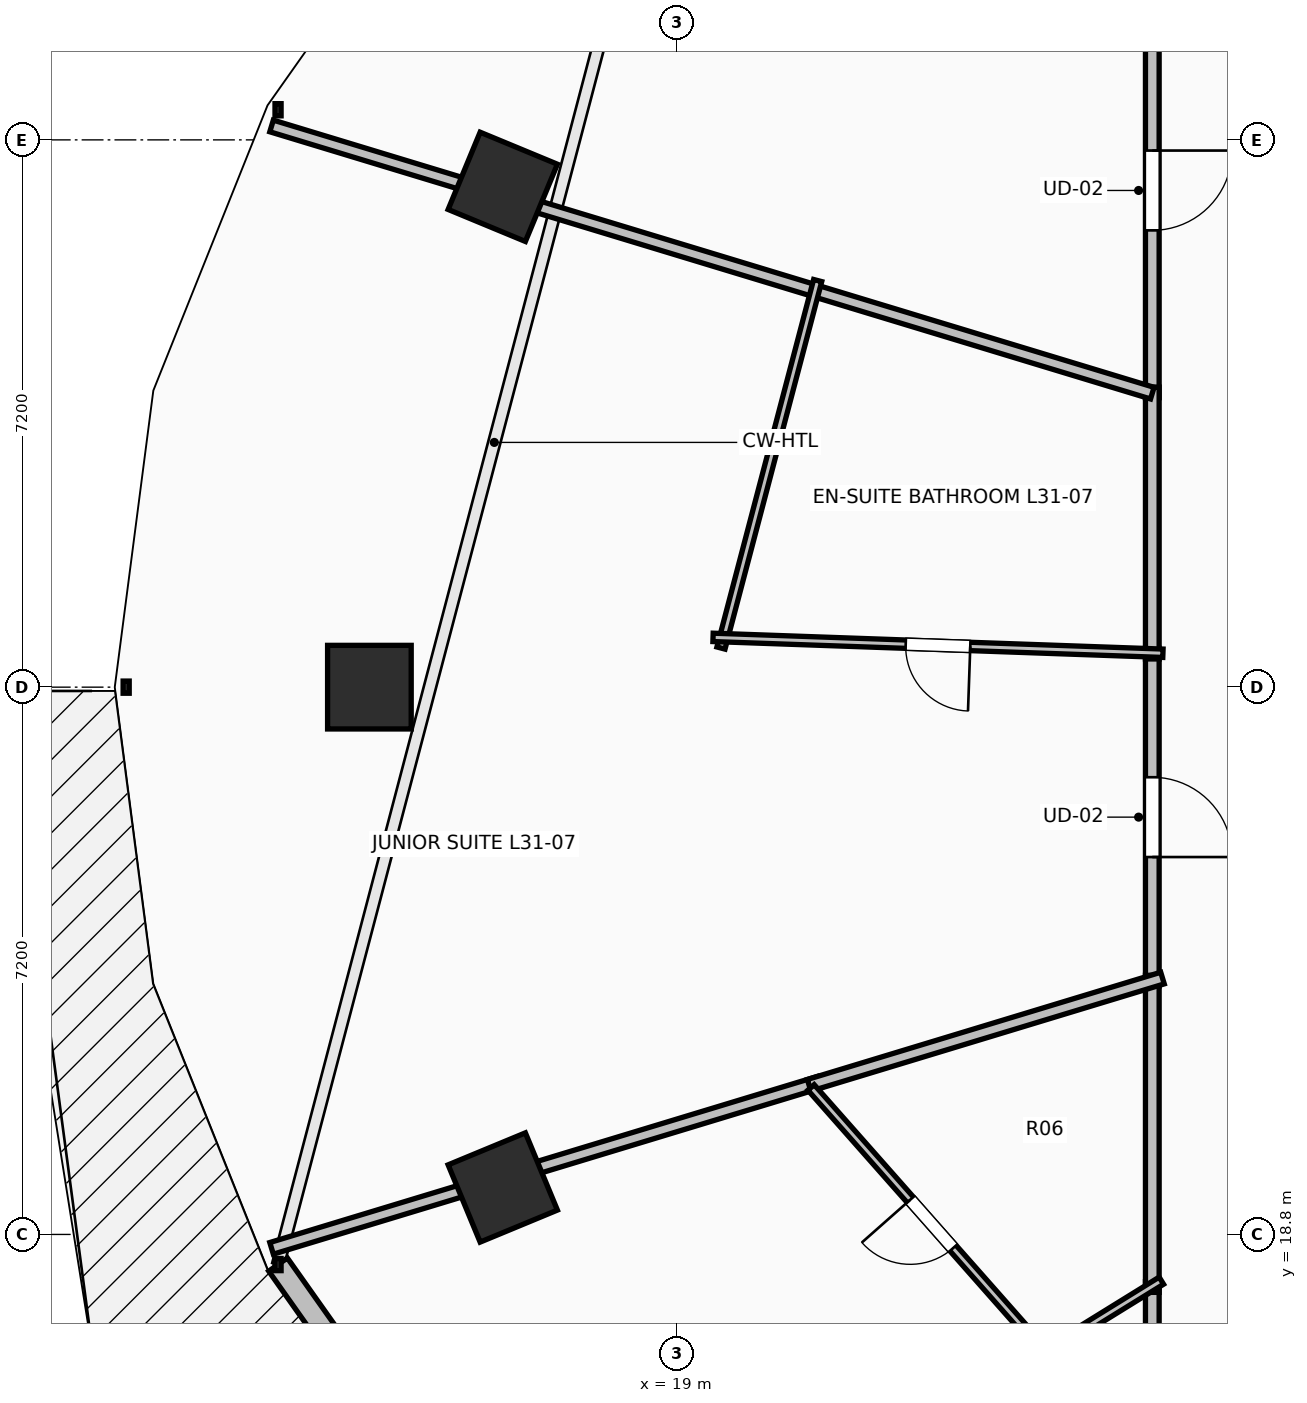
"""IFC4 building model, lengths in metres.
Left out: names, types, materials, properties, quantities, classifications, styles, units other than length and angle.
Written with IfcOpenShell. Run it as: python <this file> out.ifc"""

import sys

from ifc_helpers import new_model, si_unit, direction, frame, frame_2d, origin, origin_2d, place, context, subcontext, project, spatial, rectangle, extrude, element, fill, save


model = new_model("IFC4")
c1 = context("Model", 3, precision=1e-05, world=origin(), true_north=direction((0.0, 1.0)))
c2 = subcontext(c1, "Body", "Model", "MODEL_VIEW")
j1 = project(units=[si_unit("LENGTHUNIT", "METRE"), si_unit("PLANEANGLEUNIT", "RADIAN")], contexts=[c1])
p1 = place(None, origin())
s1 = spatial("IfcSite", under=j1, at=p1, CompositionType="ELEMENT")
p2 = place(p1, origin())
s2 = spatial("IfcBuilding", under=s1, at=p2, CompositionType="ELEMENT")
p3 = place(p2, frame((0.0, 0.0, 117.3)))
s3 = spatial("IfcBuildingStorey", under=s2, at=p3, CompositionType="ELEMENT", Elevation=117.3)
for number, where, z_axis, x_axis in (
    (1, (16.705, 32.582, 0.0), (0.0, 0.0, 1.0), (-0.924, 0.383, 0.0)),
    (2, (14.95, 26.0, 0.0), (0.0, 0.0, 1.0), (-1.0, 0.0, 0.0)),
    (3, (16.705, 19.418, 0.0), (0.0, 0.0, 1.0), (-0.924, -0.383, 0.0)),
):
    element("IfcColumn", number, at=place(p3, frame(where, z_axis=z_axis, x_axis=x_axis)), inside=s3, PredefinedType="COLUMN", context=c2, shape_type="SweptSolid", body=[
        extrude(rectangle(XDim=1.1, YDim=1.1, at=origin_2d()), origin(), (0.0, 0.0, 1.0), 3.5),
    ])
p4 = place(p3, frame((13.748, 18.404, 0.0), z_axis=(0.0, 0.0, 1.0), x_axis=(0.57716435238, -0.81662801222, 0.0)))
e4 = element("IfcWall", 4, at=p4, inside=s3, PredefinedType="STANDARD", context=c2, shape_type="SweptSolid", body=[
    extrude(rectangle(XDim=4.202, YDim=0.3, at=frame_2d((2.101, 0.0))), origin(), (0.0, 0.0, 1.0), 3.24),
])
p5 = place(p4, frame((1.351, 0.0, 0.85)))
e5 = element("IfcOpeningElement", 5, at=p5, cuts=e4, PredefinedType="OPENING", context=c2, shape_type="SweptSolid", body=[
    extrude(rectangle(XDim=1.5, YDim=2.19, at=frame_2d((0.75, 1.095))), frame((0.0, 0.165, 0.0), z_axis=(0.0, -1.0, 0.0), x_axis=(1.0, 0.0, 0.0)), (0.0, 0.0, 1.0), 0.33),
])
p6 = place(p3, frame((25.25, 35.261, 0.0), z_axis=(0.0, 0.0, 1.0), x_axis=(0.0, -1.0, 0.0)))
e6 = element("IfcWall", 6, at=p6, inside=s3, PredefinedType="PARTITIONING", context=c2, shape_type="SweptSolid", body=[
    extrude(rectangle(XDim=5.453, YDim=0.18, at=frame_2d((2.727, 0.0))), origin(), (0.0, 0.0, 1.0), 2.432),
])
p7 = place(p6, frame((2.201, 0.0, 0.0)))
e7 = element("IfcOpeningElement", 7, at=p7, cuts=e6, PredefinedType="OPENING", context=c2, shape_type="SweptSolid", body=[
    extrude(rectangle(XDim=1.05, YDim=2.2, at=frame_2d((0.525, 1.1))), frame((0.0, 0.105, 0.0), z_axis=(0.0, -1.0, 0.0), x_axis=(1.0, 0.0, 0.0)), (0.0, 0.0, 1.0), 0.21),
])
p8 = place(p3, frame((25.25, 26.511, 0.0), z_axis=(0.0, 0.0, 1.0), x_axis=(0.0, -1.0, 0.0)))
e8 = element("IfcWall", 8, at=p8, inside=s3, PredefinedType="PARTITIONING", context=c2, shape_type="SweptSolid", body=[
    extrude(rectangle(XDim=4.442, YDim=0.18, at=frame_2d((2.221, 0.0))), origin(), (0.0, 0.0, 1.0), 3.24),
])
p9 = place(p8, frame((1.696, 0.0, 0.0)))
e9 = element("IfcOpeningElement", 9, at=p9, cuts=e8, PredefinedType="OPENING", context=c2, shape_type="SweptSolid", body=[
    extrude(rectangle(XDim=1.05, YDim=2.2, at=frame_2d((0.525, 1.1))), frame((0.0, 0.105, 0.0), z_axis=(0.0, -1.0, 0.0), x_axis=(1.0, 0.0, 0.0)), (0.0, 0.0, 1.0), 0.21),
])
p10 = place(p3, frame((25.25, 29.948, 0.0), z_axis=(0.0, 0.0, 1.0), x_axis=(0.0, -1.0, 0.0)))
e10 = element("IfcWall", 10, at=p10, inside=s3, PredefinedType="PARTITIONING", context=c2, shape_type="SweptSolid", body=[
    extrude(rectangle(XDim=3.577, YDim=0.18, at=frame_2d((1.789, 0.0))), origin(), (0.0, 0.0, 1.0), 2.432),
])
p11 = place(p3, frame((25.25, 18.178, 0.0), z_axis=(0.0, 0.0, 1.0), x_axis=(0.0, -1.0, 0.0)))
e11 = element("IfcWall", 11, at=p11, inside=s3, PredefinedType="PARTITIONING", context=c2, shape_type="SweptSolid", body=[
    extrude(rectangle(XDim=4.078, YDim=0.18, at=frame_2d((2.039, 0.0))), origin(), (0.0, 0.0, 1.0), 2.432),
])
p12 = place(p11, frame((1.514, 0.0, 0.0)))
e12 = element("IfcOpeningElement", 12, at=p12, cuts=e11, PredefinedType="OPENING", context=c2, shape_type="SweptSolid", body=[
    extrude(rectangle(XDim=1.05, YDim=2.2, at=frame_2d((0.525, 1.1))), frame((0.0, 0.105, 0.0), z_axis=(0.0, -1.0, 0.0), x_axis=(1.0, 0.0, 0.0)), (0.0, 0.0, 1.0), 0.21),
])
p13 = place(p3, frame((25.25, 22.209, 0.0), z_axis=(0.0, 0.0, 1.0), x_axis=(0.0, -1.0, 0.0)))
e13 = element("IfcWall", 13, at=p13, inside=s3, PredefinedType="PARTITIONING", context=c2, shape_type="SweptSolid", body=[
    extrude(rectangle(XDim=4.171, YDim=0.18, at=frame_2d((2.085, 0.0))), origin(), (0.0, 0.0, 1.0), 3.24),
])
p14 = place(p3, frame((13.663, 33.383, 0.0), z_axis=(0.0, 0.0, 1.0), x_axis=(0.956933802543, -0.290306213422, 0.0)))
e14 = element("IfcWall", 14, at=p14, inside=s3, PredefinedType="PARTITIONING", context=c2, shape_type="SweptSolid", body=[
    extrude(rectangle(XDim=12.108, YDim=0.16, at=frame_2d((6.054, 0.0))), origin(), (0.0, 0.0, 1.0), 2.432),
])
p15 = place(p3, frame((19.575, 26.515, 0.0), z_axis=(0.0, 0.0, 1.0), x_axis=(0.254478876497, 0.967078332617, 0.0)))
e15 = element("IfcWall", 15, at=p15, inside=s3, PredefinedType="PARTITIONING", context=c2, shape_type="SweptSolid", body=[
    extrude(rectangle(XDim=4.999, YDim=0.11, at=frame_2d((2.5, 0.0))), origin(), (0.0, 0.0, 1.0), 2.432),
])
p16 = place(p3, frame((25.39, 26.446, 0.0), z_axis=(0.0, 0.0, 1.0), x_axis=(-0.999378666741, 0.03524599926, 0.0)))
e16 = element("IfcWall", 16, at=p16, inside=s3, PredefinedType="PARTITIONING", context=c2, shape_type="SweptSolid", body=[
    extrude(rectangle(XDim=5.922, YDim=0.11, at=frame_2d((2.961, 0.0))), origin(), (0.0, 0.0, 1.0), 2.432),
])
p17 = place(p16, frame((2.536, 0.0, 0.0)))
e17 = element("IfcOpeningElement", 17, at=p17, cuts=e16, PredefinedType="OPENING", context=c2, shape_type="SweptSolid", body=[
    extrude(rectangle(XDim=0.85, YDim=2.1, at=frame_2d((0.425, 1.05))), frame((0.0, 0.07, 0.0), z_axis=(0.0, -1.0, 0.0), x_axis=(1.0, 0.0, 0.0)), (0.0, 0.0, 1.0), 0.14),
])
p18 = place(p3, frame((13.663, 18.617, 0.0), z_axis=(0.0, 0.0, 1.0), x_axis=(0.956933827214, 0.290306132098, 0.0)))
e18 = element("IfcWall", 18, at=p18, inside=s3, PredefinedType="PARTITIONING", context=c2, shape_type="SweptSolid", body=[
    extrude(rectangle(XDim=7.53, YDim=0.16, at=frame_2d((3.765, 0.0))), origin(), (0.0, 0.0, 1.0), 2.929),
])
p19 = place(p3, frame((20.735, 20.762, 0.0), z_axis=(0.0, 0.0, 1.0), x_axis=(0.956916986017, 0.290361639807, 0.0)))
e19 = element("IfcWall", 19, at=p19, inside=s3, PredefinedType="PARTITIONING", context=c2, shape_type="SweptSolid", body=[
    extrude(rectangle(XDim=4.858, YDim=0.16, at=frame_2d((2.429, 0.0))), origin(), (0.0, 0.0, 1.0), 2.874),
])
p20 = place(p3, frame((25.369, 18.192, 0.0), z_axis=(0.0, 0.0, 1.0), x_axis=(-0.850587393094, -0.525833706328, 0.0)))
e20 = element("IfcWall", 20, at=p20, inside=s3, PredefinedType="PARTITIONING", context=c2, shape_type="SweptSolid", body=[
    extrude(rectangle(XDim=1.937, YDim=0.11, at=frame_2d((0.968, 0.0))), origin(), (0.0, 0.0, 1.0), 2.432),
])
p21 = place(p3, frame((23.934, 17.142, 0.0), z_axis=(0.0, 0.0, 1.0), x_axis=(-0.662103338525, 0.749412549344, 0.0)))
e21 = element("IfcWall", 21, at=p21, inside=s3, PredefinedType="PARTITIONING", context=c2, shape_type="SweptSolid", body=[
    extrude(rectangle(XDim=4.793, YDim=0.11, at=frame_2d((2.396, 0.0))), origin(), (0.0, 0.0, 1.0), 2.432),
])
p22 = place(p21, frame((1.971, 0.0, 0.0)))
e22 = element("IfcOpeningElement", 22, at=p22, cuts=e21, PredefinedType="OPENING", context=c2, shape_type="SweptSolid", body=[
    extrude(rectangle(XDim=0.85, YDim=2.1, at=frame_2d((0.425, 1.05))), frame((0.0, 0.07, 0.0), z_axis=(0.0, -1.0, 0.0), x_axis=(1.0, 0.0, 0.0)), (0.0, 0.0, 1.0), 0.14),
])
p23 = place(p7, origin())
e23 = element("IfcDoor", 23, at=p23, inside=s3, OperationType="SINGLE_SWING_LEFT", PredefinedType="DOOR", context=c2, shape_type="SweptSolid", body=[
    extrude(rectangle(XDim=1.05, YDim=2.2, at=frame_2d((0.525, 1.1))), frame((0.0, 0.025, 0.0), z_axis=(0.0, -1.0, 0.0), x_axis=(1.0, 0.0, 0.0)), (0.0, 0.0, 1.0), 0.05),
])
fill(e7, e23)
p24 = place(p9, origin())
e24 = element("IfcDoor", 24, at=p24, inside=s3, OperationType="SINGLE_SWING_RIGHT", PredefinedType="DOOR", context=c2, shape_type="SweptSolid", body=[
    extrude(rectangle(XDim=1.05, YDim=2.2, at=frame_2d((0.525, 1.1))), frame((0.0, 0.025, 0.0), z_axis=(0.0, -1.0, 0.0), x_axis=(1.0, 0.0, 0.0)), (0.0, 0.0, 1.0), 0.05),
])
fill(e9, e24)
p25 = place(p17, origin())
e25 = element("IfcDoor", 25, at=p25, inside=s3, OperationType="SINGLE_SWING_LEFT", PredefinedType="DOOR", context=c2, shape_type="SweptSolid", body=[
    extrude(rectangle(XDim=0.85, YDim=2.1, at=frame_2d((0.425, 1.05))), frame((0.0, 0.025, 0.0), z_axis=(0.0, -1.0, 0.0), x_axis=(1.0, 0.0, 0.0)), (0.0, 0.0, 1.0), 0.05),
])
fill(e17, e25)
p26 = place(p22, origin())
e26 = element("IfcDoor", 26, at=p26, inside=s3, OperationType="SINGLE_SWING_RIGHT", PredefinedType="DOOR", context=c2, shape_type="SweptSolid", body=[
    extrude(rectangle(XDim=0.85, YDim=2.1, at=frame_2d((0.425, 1.05))), frame((0.0, 0.025, 0.0), z_axis=(0.0, -1.0, 0.0), x_axis=(1.0, 0.0, 0.0)), (0.0, 0.0, 1.0), 0.05),
])
fill(e22, e26)
save(model, sys.argv[1])
